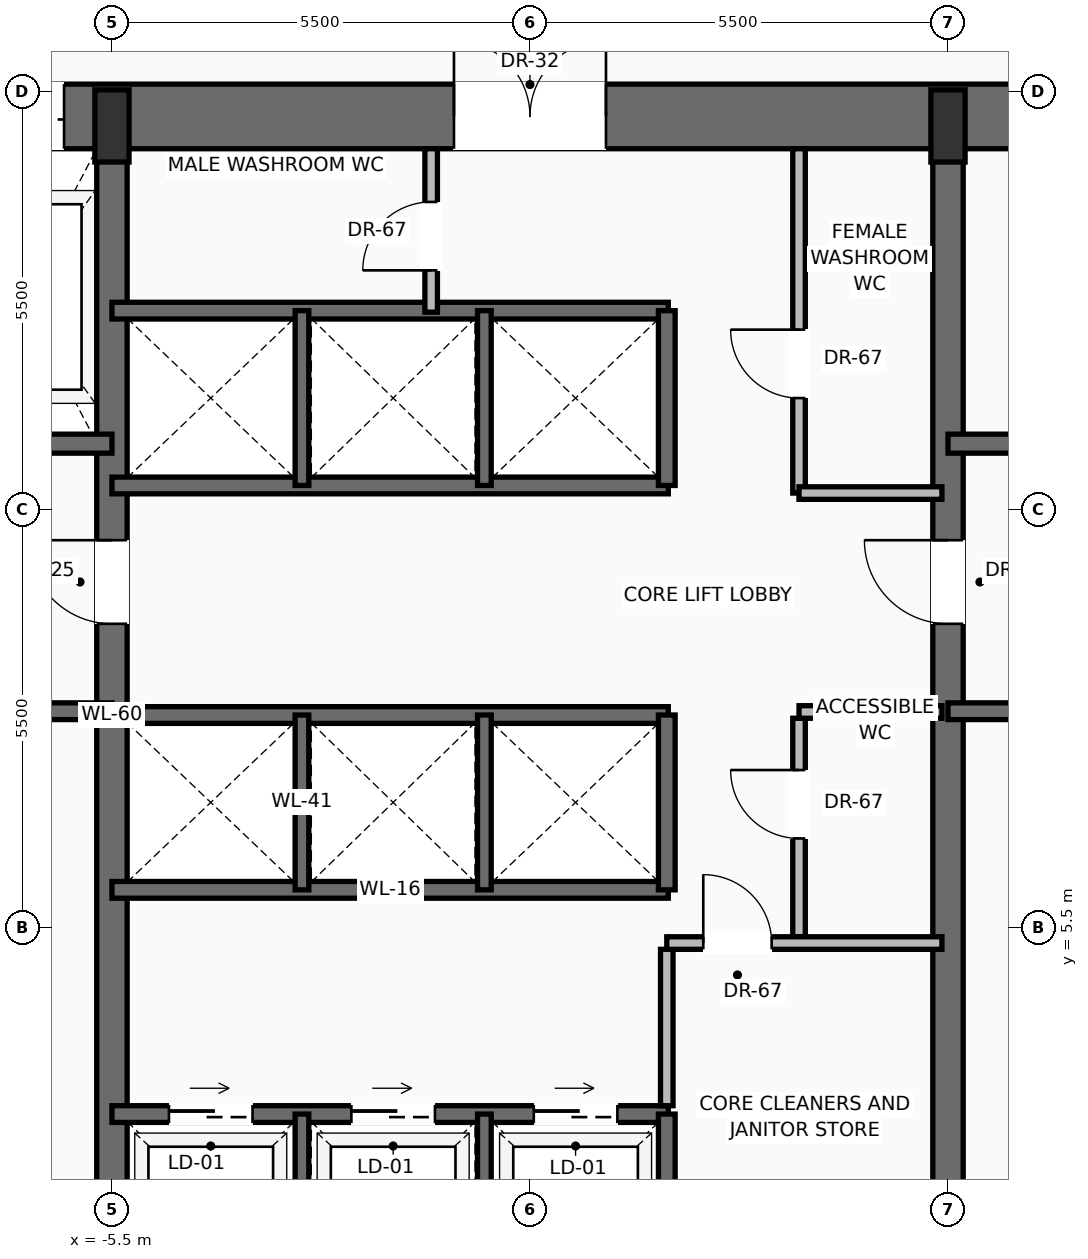
"""IFC4 building model, lengths in metres.
Left out: names, types, materials, properties, quantities, classifications, styles, units other than length and angle.
Written with IfcOpenShell. Run it as: python <this file> out.ifc"""

import sys

from ifc_helpers import new_model, si_unit, direction, frame, frame_2d, origin, origin_2d, place, context, subcontext, project, spatial, rectangle, extrude, source, transform, mapped, element, fill, save


model = new_model("IFC4")
c1 = context("Model", 3, precision=1e-05, world=origin(), true_north=direction((0.0, 1.0)))
c2 = subcontext(c1, "Body", "Model", "MODEL_VIEW")
j1 = project(units=[si_unit("LENGTHUNIT", "METRE"), si_unit("PLANEANGLEUNIT", "RADIAN")], contexts=[c1])
p1 = place(None, origin())
s1 = spatial("IfcSite", under=j1, at=p1, CompositionType="ELEMENT")
p2 = place(p1, origin())
s2 = spatial("IfcBuilding", under=s1, at=p2, CompositionType="ELEMENT")
p3 = place(p2, frame((0.0, 0.0, 38.6)))
s3 = spatial("IfcBuildingStorey", under=s2, at=p3, CompositionType="ELEMENT", Elevation=38.6)
p4 = place(p3, frame((-11.0, 16.175, 0.0), z_axis=(0.0, 0.0, 1.0), x_axis=(1.0, 0.0, 0.0)))
e1 = element("IfcWall", 1, at=p4, inside=s3, PredefinedType="SHEAR", context=c2, shape_type="SweptSolid", body=[
    extrude(rectangle(XDim=22.0, YDim=0.85, at=frame_2d((11.0, 0.0))), origin(), (0.0, 0.0, 1.0), 3.45),
])
p5 = place(p4, frame((3.57, 0.0, 0.0)))
e2 = element("IfcOpeningElement", 2, at=p5, cuts=e1, PredefinedType="OPENING", context=c2, shape_type="SweptSolid", body=[
    extrude(rectangle(XDim=1.3, YDim=2.3, at=frame_2d((0.65, 1.15))), frame((0.0, 0.435, 0.0), z_axis=(0.0, -1.0, 0.0), x_axis=(1.0, 0.0, 0.0)), (0.0, 0.0, 1.0), 0.87),
])
p6 = place(p4, frame((10.0, 0.0, 0.0)))
e3 = element("IfcOpeningElement", 3, at=p6, cuts=e1, PredefinedType="OPENING", context=c2, shape_type="SweptSolid", body=[
    extrude(rectangle(XDim=2.0, YDim=2.4, at=frame_2d((1.0, 1.2))), frame((0.0, 0.435, 0.0), z_axis=(0.0, -1.0, 0.0), x_axis=(1.0, 0.0, 0.0)), (0.0, 0.0, 1.0), 0.87),
])
p7 = place(p3, frame((-5.5, 0.425, 0.0), z_axis=(0.0, 0.0, 1.0), x_axis=(0.0, 1.0, 0.0)))
e4 = element("IfcWall", 4, at=p7, inside=s3, PredefinedType="SHEAR", context=c2, shape_type="SweptSolid", body=[
    extrude(rectangle(XDim=15.75, YDim=0.4, at=frame_2d((7.875, 0.0))), origin(), (0.0, 0.0, 1.0), 3.45),
])
p8 = place(p7, frame((9.075, 0.0, 0.0)))
e5 = element("IfcOpeningElement", 5, at=p8, cuts=e4, PredefinedType="OPENING", context=c2, shape_type="SweptSolid", body=[
    extrude(rectangle(XDim=1.1, YDim=2.2, at=frame_2d((0.55, 1.1))), frame((0.0, 0.21, 0.0), z_axis=(0.0, -1.0, 0.0), x_axis=(1.0, 0.0, 0.0)), (0.0, 0.0, 1.0), 0.42),
])
p9 = place(p3, frame((5.5, 0.425, 0.0), z_axis=(0.0, 0.0, 1.0), x_axis=(0.0, 1.0, 0.0)))
e6 = element("IfcWall", 6, at=p9, inside=s3, PredefinedType="SHEAR", context=c2, shape_type="SweptSolid", body=[
    extrude(rectangle(XDim=15.75, YDim=0.4, at=frame_2d((7.875, 0.0))), origin(), (0.0, 0.0, 1.0), 3.45),
])
p10 = place(p9, frame((9.075, 0.0, 0.0)))
e7 = element("IfcOpeningElement", 7, at=p10, cuts=e6, PredefinedType="OPENING", context=c2, shape_type="SweptSolid", body=[
    extrude(rectangle(XDim=1.1, YDim=2.2, at=frame_2d((0.55, 1.1))), frame((0.0, 0.21, 0.0), z_axis=(0.0, -1.0, 0.0), x_axis=(1.0, 0.0, 0.0)), (0.0, 0.0, 1.0), 0.42),
])
m1 = source(origin(), c2, "Body", "SweptSolid", [
    extrude(rectangle(XDim=0.45, YDim=0.95, at=origin_2d()), origin(), (0.0, 0.0, 1.0), 3.7),
])
for number, where, z_axis, x_axis in (
    (8, (-5.5, 16.05, 0.0), (0.0, 0.0, 1.0), (1.0, 0.0, 0.0)),
    (9, (5.5, 16.05, 0.0), (0.0, 0.0, 1.0), (1.0, 0.0, 0.0)),
):
    element("IfcColumn", number, at=place(p3, frame(where, z_axis=z_axis, x_axis=x_axis)), inside=s3, PredefinedType="PILASTER", context=c2, shape_type="MappedRepresentation", body=[
        mapped(m1, transform((0.0, 0.0, 0.0), scale=1.0)),
    ])
p11 = place(p3, frame((-5.5, 8.35, 0.0), z_axis=(0.0, 0.0, 1.0), x_axis=(-1.0, 0.0, 0.0)))
e10 = element("IfcWall", 10, at=p11, inside=s3, PredefinedType="SOLIDWALL", context=c2, shape_type="SweptSolid", body=[
    extrude(rectangle(XDim=4.65, YDim=0.22, at=frame_2d((2.325, 0.0))), origin(), (0.0, 0.0, 1.0), 3.45),
])
p12 = place(p11, frame((2.5, 0.0, 0.0)))
e11 = element("IfcOpeningElement", 11, at=p12, cuts=e10, PredefinedType="OPENING", context=c2, shape_type="SweptSolid", body=[
    extrude(rectangle(XDim=1.15, YDim=2.2, at=frame_2d((0.575, 1.1))), frame((0.0, 0.12, 0.0), z_axis=(0.0, -1.0, 0.0), x_axis=(1.0, 0.0, 0.0)), (0.0, 0.0, 1.0), 0.24),
])
p13 = place(p3, frame((-5.5, 11.87, 0.0), z_axis=(0.0, 0.0, 1.0), x_axis=(-1.0, 0.0, 0.0)))
e12 = element("IfcWall", 12, at=p13, inside=s3, PredefinedType="SOLIDWALL", context=c2, shape_type="SweptSolid", body=[
    extrude(rectangle(XDim=4.65, YDim=0.25, at=frame_2d((2.325, 0.0))), origin(), (0.0, 0.0, 1.0), 3.45),
])
p14 = place(p13, frame((2.95, 0.0, 0.0)))
e13 = element("IfcOpeningElement", 13, at=p14, cuts=e12, PredefinedType="OPENING", context=c2, shape_type="SweptSolid", body=[
    extrude(rectangle(XDim=1.2, YDim=2.25, at=frame_2d((0.6, 1.125))), frame((0.0, 0.135, 0.0), z_axis=(0.0, -1.0, 0.0), x_axis=(1.0, 0.0, 0.0)), (0.0, 0.0, 1.0), 0.27),
])
p15 = place(p3, frame((10.15, 8.35, 0.0), z_axis=(0.0, 0.0, 1.0), x_axis=(-1.0, 0.0, 0.0)))
e14 = element("IfcWall", 14, at=p15, inside=s3, PredefinedType="SOLIDWALL", context=c2, shape_type="SweptSolid", body=[
    extrude(rectangle(XDim=4.65, YDim=0.22, at=frame_2d((2.325, 0.0))), origin(), (0.0, 0.0, 1.0), 3.45),
])
p16 = place(p15, frame((1.0, 0.0, 0.0)))
e15 = element("IfcOpeningElement", 15, at=p16, cuts=e14, PredefinedType="OPENING", context=c2, shape_type="SweptSolid", body=[
    extrude(rectangle(XDim=1.15, YDim=2.2, at=frame_2d((0.575, 1.1))), frame((0.0, 0.12, 0.0), z_axis=(0.0, -1.0, 0.0), x_axis=(1.0, 0.0, 0.0)), (0.0, 0.0, 1.0), 0.24),
])
p17 = place(p3, frame((10.15, 11.87, 0.0), z_axis=(0.0, 0.0, 1.0), x_axis=(-1.0, 0.0, 0.0)))
e16 = element("IfcWall", 16, at=p17, inside=s3, PredefinedType="SOLIDWALL", context=c2, shape_type="SweptSolid", body=[
    extrude(rectangle(XDim=4.65, YDim=0.25, at=frame_2d((2.325, 0.0))), origin(), (0.0, 0.0, 1.0), 3.45),
])
p18 = place(p17, frame((0.5, 0.0, 0.0)))
e17 = element("IfcOpeningElement", 17, at=p18, cuts=e16, PredefinedType="OPENING", context=c2, shape_type="SweptSolid", body=[
    extrude(rectangle(XDim=1.2, YDim=2.25, at=frame_2d((0.6, 1.125))), frame((0.0, 0.135, 0.0), z_axis=(0.0, -1.0, 0.0), x_axis=(1.0, 0.0, 0.0)), (0.0, 0.0, 1.0), 0.27),
])
p19 = place(p3, frame((-5.5, 3.05, 0.0), z_axis=(0.0, 0.0, 1.0), x_axis=(1.0, 0.0, 0.0)))
e18 = element("IfcWall", 18, at=p19, inside=s3, PredefinedType="SOLIDWALL", context=c2, shape_type="SweptSolid", body=[
    extrude(rectangle(XDim=7.32, YDim=0.22, at=frame_2d((3.66, 0.0))), origin(), (0.0, 0.0, 1.0), 3.45),
])
p20 = place(p19, frame((0.75, 0.0, 0.0)))
e19 = element("IfcOpeningElement", 19, at=p20, cuts=e18, PredefinedType="OPENING", context=c2, shape_type="SweptSolid", body=[
    extrude(rectangle(XDim=1.1, YDim=2.2, at=frame_2d((0.55, 1.1))), frame((0.0, 0.12, 0.0), z_axis=(0.0, -1.0, 0.0), x_axis=(1.0, 0.0, 0.0)), (0.0, 0.0, 1.0), 0.24),
])
p21 = place(p19, frame((3.15, 0.0, 0.0)))
e20 = element("IfcOpeningElement", 20, at=p21, cuts=e18, PredefinedType="OPENING", context=c2, shape_type="SweptSolid", body=[
    extrude(rectangle(XDim=1.1, YDim=2.2, at=frame_2d((0.55, 1.1))), frame((0.0, 0.12, 0.0), z_axis=(0.0, -1.0, 0.0), x_axis=(1.0, 0.0, 0.0)), (0.0, 0.0, 1.0), 0.24),
])
p22 = place(p19, frame((5.55, 0.0, 0.0)))
e21 = element("IfcOpeningElement", 21, at=p22, cuts=e18, PredefinedType="OPENING", context=c2, shape_type="SweptSolid", body=[
    extrude(rectangle(XDim=1.1, YDim=2.2, at=frame_2d((0.55, 1.1))), frame((0.0, 0.12, 0.0), z_axis=(0.0, -1.0, 0.0), x_axis=(1.0, 0.0, 0.0)), (0.0, 0.0, 1.0), 0.24),
])
p23 = place(p3, frame((1.8, 0.85, 0.0), z_axis=(0.0, 0.0, 1.0), x_axis=(0.0, 1.0, 0.0)))
e22 = element("IfcWall", 22, at=p23, inside=s3, PredefinedType="SOLIDWALL", context=c2, shape_type="SweptSolid", body=[
    extrude(rectangle(XDim=2.2, YDim=0.22, at=frame_2d((1.1, 0.0))), origin(), (0.0, 0.0, 1.0), 3.45),
])
for number, where, z_axis, x_axis in (
    (23, (-3.0, 0.85, 0.0), (0.0, 0.0, 1.0), (0.0, 1.0, 0.0)),
    (24, (-0.6, 0.85, 0.0), (0.0, 0.0, 1.0), (0.0, 1.0, 0.0)),
):
    element("IfcWall", number, at=place(p3, frame(where, z_axis=z_axis, x_axis=x_axis)), inside=s3, PredefinedType="SOLIDWALL", context=c2, shape_type="SweptSolid", body=[
        extrude(rectangle(XDim=2.2, YDim=0.18, at=frame_2d((1.1, 0.0))), origin(), (0.0, 0.0, 1.0), 3.45),
    ])
p24 = place(p3, frame((1.8, 3.16, 0.0), z_axis=(0.0, 0.0, 1.0), x_axis=(0.0, 1.0, 0.0)))
e25 = element("IfcWall", 25, at=p24, inside=s3, PredefinedType="PARTITIONING", context=c2, shape_type="SweptSolid", body=[
    extrude(rectangle(XDim=2.058, YDim=0.165, at=frame_2d((1.029, 0.0))), origin(), (0.0, 0.0, 1.0), 3.442),
])
p25 = place(p3, frame((3.54, 5.383, 0.0), z_axis=(0.0, 0.0, 1.0), x_axis=(0.0, 1.0, 0.0)))
e26 = element("IfcWall", 26, at=p25, inside=s3, PredefinedType="PARTITIONING", context=c2, shape_type="SweptSolid", body=[
    extrude(rectangle(XDim=2.875, YDim=0.165, at=frame_2d((1.438, 0.0))), origin(), (0.0, 0.0, 1.0), 3.442),
])
p26 = place(p25, frame((1.294, 0.0, 0.0)))
e27 = element("IfcOpeningElement", 27, at=p26, cuts=e26, PredefinedType="OPENING", context=c2, shape_type="SweptSolid", body=[
    extrude(rectangle(XDim=0.9, YDim=2.1, at=frame_2d((0.45, 1.05))), frame((0.0, 0.093, 0.0), z_axis=(0.0, -1.0, 0.0), x_axis=(1.0, 0.0, 0.0)), (0.0, 0.0, 1.0), 0.185),
])
p27 = place(p3, frame((3.54, 8.34, 0.0), z_axis=(0.0, 0.0, 1.0), x_axis=(1.0, 0.0, 0.0)))
e28 = element("IfcWall", 28, at=p27, inside=s3, PredefinedType="PARTITIONING", context=c2, shape_type="SweptSolid", body=[
    extrude(rectangle(XDim=1.88, YDim=0.165, at=frame_2d((0.94, 0.0))), origin(), (0.0, 0.0, 1.0), 3.442),
])
p28 = place(p3, frame((1.8, 5.3, 0.0), z_axis=(0.0, 0.0, 1.0), x_axis=(1.0, 0.0, 0.0)))
e29 = element("IfcWall", 29, at=p28, inside=s3, PredefinedType="PARTITIONING", context=c2, shape_type="SweptSolid", body=[
    extrude(rectangle(XDim=3.62, YDim=0.165, at=frame_2d((1.81, 0.0))), origin(), (0.0, 0.0, 1.0), 3.442),
])
p29 = place(p28, frame((0.48, 0.0, 0.0)))
e30 = element("IfcOpeningElement", 30, at=p29, cuts=e29, PredefinedType="OPENING", context=c2, shape_type="SweptSolid", body=[
    extrude(rectangle(XDim=0.9, YDim=2.1, at=frame_2d((0.45, 1.05))), frame((0.0, 0.093, 0.0), z_axis=(0.0, -1.0, 0.0), x_axis=(1.0, 0.0, 0.0)), (0.0, 0.0, 1.0), 0.185),
])
for number, where, z_axis, x_axis in (
    (31, (-5.5, 6.0, 0.0), (0.0, 0.0, 1.0), (1.0, 0.0, 0.0)),
    (32, (-5.5, 8.3, 0.0), (0.0, 0.0, 1.0), (1.0, 0.0, 0.0)),
):
    element("IfcWall", number, at=place(p3, frame(where, z_axis=z_axis, x_axis=x_axis)), inside=s3, PredefinedType="SOLIDWALL", context=c2, shape_type="SweptSolid", body=[
        extrude(rectangle(XDim=7.32, YDim=0.22, at=frame_2d((3.66, 0.0))), origin(), (0.0, 0.0, 1.0), 3.45),
    ])
p30 = place(p3, frame((1.8, 6.0, 0.0), z_axis=(0.0, 0.0, 1.0), x_axis=(0.0, 1.0, 0.0)))
e33 = element("IfcWall", 33, at=p30, inside=s3, PredefinedType="SOLIDWALL", context=c2, shape_type="SweptSolid", body=[
    extrude(rectangle(XDim=2.3, YDim=0.22, at=frame_2d((1.15, 0.0))), origin(), (0.0, 0.0, 1.0), 3.45),
])
for number, where, z_axis, x_axis in (
    (34, (-3.0, 6.0, 0.0), (0.0, 0.0, 1.0), (0.0, 1.0, 0.0)),
    (35, (-0.6, 6.0, 0.0), (0.0, 0.0, 1.0), (0.0, 1.0, 0.0)),
):
    element("IfcWall", number, at=place(p3, frame(where, z_axis=z_axis, x_axis=x_axis)), inside=s3, PredefinedType="SOLIDWALL", context=c2, shape_type="SweptSolid", body=[
        extrude(rectangle(XDim=2.3, YDim=0.18, at=frame_2d((1.15, 0.0))), origin(), (0.0, 0.0, 1.0), 3.45),
    ])
for number, where, z_axis, x_axis in (
    (36, (-5.5, 11.32, 0.0), (0.0, 0.0, 1.0), (1.0, 0.0, 0.0)),
    (37, (-5.5, 13.62, 0.0), (0.0, 0.0, 1.0), (1.0, 0.0, 0.0)),
):
    element("IfcWall", number, at=place(p3, frame(where, z_axis=z_axis, x_axis=x_axis)), inside=s3, PredefinedType="SOLIDWALL", context=c2, shape_type="SweptSolid", body=[
        extrude(rectangle(XDim=7.32, YDim=0.22, at=frame_2d((3.66, 0.0))), origin(), (0.0, 0.0, 1.0), 3.45),
    ])
p31 = place(p3, frame((1.8, 11.32, 0.0), z_axis=(0.0, 0.0, 1.0), x_axis=(0.0, 1.0, 0.0)))
e38 = element("IfcWall", 38, at=p31, inside=s3, PredefinedType="SOLIDWALL", context=c2, shape_type="SweptSolid", body=[
    extrude(rectangle(XDim=2.3, YDim=0.22, at=frame_2d((1.15, 0.0))), origin(), (0.0, 0.0, 1.0), 3.45),
])
for number, where, z_axis, x_axis in (
    (39, (-3.0, 11.32, 0.0), (0.0, 0.0, 1.0), (0.0, 1.0, 0.0)),
    (40, (-0.6, 11.32, 0.0), (0.0, 0.0, 1.0), (0.0, 1.0, 0.0)),
):
    element("IfcWall", number, at=place(p3, frame(where, z_axis=z_axis, x_axis=x_axis)), inside=s3, PredefinedType="SOLIDWALL", context=c2, shape_type="SweptSolid", body=[
        extrude(rectangle(XDim=2.3, YDim=0.18, at=frame_2d((1.15, 0.0))), origin(), (0.0, 0.0, 1.0), 3.45),
    ])
p32 = place(p3, frame((-1.3, 13.6, 0.0), z_axis=(0.0, 0.0, 1.0), x_axis=(0.0, 1.0, 0.0)))
e41 = element("IfcWall", 41, at=p32, inside=s3, PredefinedType="PARTITIONING", context=c2, shape_type="SweptSolid", body=[
    extrude(rectangle(XDim=2.15, YDim=0.165, at=frame_2d((1.075, 0.0))), origin(), (0.0, 0.0, 1.0), 3.442),
])
p33 = place(p32, frame((0.55, 0.0, 0.0)))
e42 = element("IfcOpeningElement", 42, at=p33, cuts=e41, PredefinedType="OPENING", context=c2, shape_type="SweptSolid", body=[
    extrude(rectangle(XDim=0.9, YDim=2.1, at=frame_2d((0.45, 1.05))), frame((0.0, 0.093, 0.0), z_axis=(0.0, -1.0, 0.0), x_axis=(1.0, 0.0, 0.0)), (0.0, 0.0, 1.0), 0.185),
])
p34 = place(p3, frame((3.54, 11.22, 0.0), z_axis=(0.0, 0.0, 1.0), x_axis=(0.0, 1.0, 0.0)))
e43 = element("IfcWall", 43, at=p34, inside=s3, PredefinedType="PARTITIONING", context=c2, shape_type="SweptSolid", body=[
    extrude(rectangle(XDim=4.53, YDim=0.165, at=frame_2d((2.265, 0.0))), origin(), (0.0, 0.0, 1.0), 3.442),
])
p35 = place(p34, frame((1.25, 0.0, 0.0)))
e44 = element("IfcOpeningElement", 44, at=p35, cuts=e43, PredefinedType="OPENING", context=c2, shape_type="SweptSolid", body=[
    extrude(rectangle(XDim=0.9, YDim=2.1, at=frame_2d((0.45, 1.05))), frame((0.0, 0.093, 0.0), z_axis=(0.0, -1.0, 0.0), x_axis=(1.0, 0.0, 0.0)), (0.0, 0.0, 1.0), 0.185),
])
p36 = place(p3, frame((3.54, 11.22, 0.0), z_axis=(0.0, 0.0, 1.0), x_axis=(1.0, 0.0, 0.0)))
e45 = element("IfcWall", 45, at=p36, inside=s3, PredefinedType="PARTITIONING", context=c2, shape_type="SweptSolid", body=[
    extrude(rectangle(XDim=1.88, YDim=0.165, at=frame_2d((0.94, 0.0))), origin(), (0.0, 0.0, 1.0), 3.442),
])
m2 = source(origin(), c2, "Body", "SweptSolid", [
    extrude(rectangle(XDim=1.1, YDim=2.2, at=frame_2d((0.55, 1.1))), frame((0.0, 0.025, 0.0), z_axis=(0.0, -1.0, 0.0), x_axis=(1.0, 0.0, 0.0)), (0.0, 0.0, 1.0), 0.05),
])
p37 = place(p8, origin())
e46 = element("IfcDoor", 46, at=p37, inside=s3, OperationType="SINGLE_SWING_RIGHT", PredefinedType="DOOR", context=c2, shape_type="MappedRepresentation", body=[
    mapped(m2, transform((0.0, 0.0, 0.0), scale=1.0)),
])
fill(e5, e46)
m3 = source(origin(), c2, "Body", "SweptSolid", [
    extrude(rectangle(XDim=1.3, YDim=2.3, at=frame_2d((0.65, 1.15))), frame((0.0, 0.025, 0.0), z_axis=(0.0, -1.0, 0.0), x_axis=(1.0, 0.0, 0.0)), (0.0, 0.0, 1.0), 0.05),
])
p38 = place(p5, origin())
e47 = element("IfcDoor", 47, at=p38, inside=s3, OperationType="SLIDING_TO_RIGHT", PredefinedType="DOOR", context=c2, shape_type="MappedRepresentation", body=[
    mapped(m3, transform((0.0, 0.0, 0.0), scale=1.0)),
])
fill(e2, e47)
p39 = place(p10, origin())
e48 = element("IfcDoor", 48, at=p39, inside=s3, OperationType="SINGLE_SWING_RIGHT", PredefinedType="DOOR", context=c2, shape_type="MappedRepresentation", body=[
    mapped(m2, transform((0.0, 0.0, 0.0), scale=1.0)),
])
fill(e7, e48)
m4 = source(origin(), c2, "Body", "SweptSolid", [
    extrude(rectangle(XDim=2.0, YDim=2.4, at=frame_2d((1.0, 1.2))), frame((0.0, 0.025, 0.0), z_axis=(0.0, -1.0, 0.0), x_axis=(1.0, 0.0, 0.0)), (0.0, 0.0, 1.0), 0.05),
])
p40 = place(p6, origin())
e49 = element("IfcDoor", 49, at=p40, inside=s3, OperationType="DOUBLE_DOOR_SINGLE_SWING", PredefinedType="DOOR", context=c2, shape_type="MappedRepresentation", body=[
    mapped(m4, transform((0.0, 0.0, 0.0), scale=1.0)),
])
fill(e3, e49)
m5 = source(origin(), c2, "Body", "SweptSolid", [
    extrude(rectangle(XDim=1.1, YDim=2.2, at=frame_2d((0.55, 1.1))), frame((0.0, 0.025, 0.0), z_axis=(0.0, -1.0, 0.0), x_axis=(1.0, 0.0, 0.0)), (0.0, 0.0, 1.0), 0.05),
])
p41 = place(p20, origin())
e50 = element("IfcDoor", 50, at=p41, inside=s3, OperationType="SLIDING_TO_RIGHT", PredefinedType="DOOR", context=c2, shape_type="MappedRepresentation", body=[
    mapped(m5, transform((0.0, 0.0, 0.0), scale=1.0)),
])
fill(e19, e50)
p42 = place(p21, origin())
e51 = element("IfcDoor", 51, at=p42, inside=s3, OperationType="SLIDING_TO_RIGHT", PredefinedType="DOOR", context=c2, shape_type="MappedRepresentation", body=[
    mapped(m5, transform((0.0, 0.0, 0.0), scale=1.0)),
])
fill(e20, e51)
p43 = place(p22, origin())
e52 = element("IfcDoor", 52, at=p43, inside=s3, OperationType="SLIDING_TO_RIGHT", PredefinedType="DOOR", context=c2, shape_type="MappedRepresentation", body=[
    mapped(m5, transform((0.0, 0.0, 0.0), scale=1.0)),
])
fill(e21, e52)
m6 = source(origin(), c2, "Body", "SweptSolid", [
    extrude(rectangle(XDim=0.9, YDim=2.1, at=frame_2d((0.45, 1.05))), frame((0.0, 0.025, 0.0), z_axis=(0.0, -1.0, 0.0), x_axis=(1.0, 0.0, 0.0)), (0.0, 0.0, 1.0), 0.05),
])
p44 = place(p29, origin())
e53 = element("IfcDoor", 53, at=p44, inside=s3, OperationType="SINGLE_SWING_LEFT", PredefinedType="DOOR", context=c2, shape_type="MappedRepresentation", body=[
    mapped(m6, transform((0.0, 0.0, 0.0), scale=1.0)),
])
fill(e30, e53)
p45 = place(p26, origin())
e54 = element("IfcDoor", 54, at=p45, inside=s3, OperationType="SINGLE_SWING_RIGHT", PredefinedType="DOOR", context=c2, shape_type="MappedRepresentation", body=[
    mapped(m6, transform((0.0, 0.0, 0.0), scale=1.0)),
])
fill(e27, e54)
p46 = place(p33, origin())
e55 = element("IfcDoor", 55, at=p46, inside=s3, OperationType="SINGLE_SWING_LEFT", PredefinedType="DOOR", context=c2, shape_type="MappedRepresentation", body=[
    mapped(m6, transform((0.0, 0.0, 0.0), scale=1.0)),
])
fill(e42, e55)
p47 = place(p35, origin())
e56 = element("IfcDoor", 56, at=p47, inside=s3, OperationType="SINGLE_SWING_RIGHT", PredefinedType="DOOR", context=c2, shape_type="MappedRepresentation", body=[
    mapped(m6, transform((0.0, 0.0, 0.0), scale=1.0)),
])
fill(e44, e56)
save(model, sys.argv[1])
